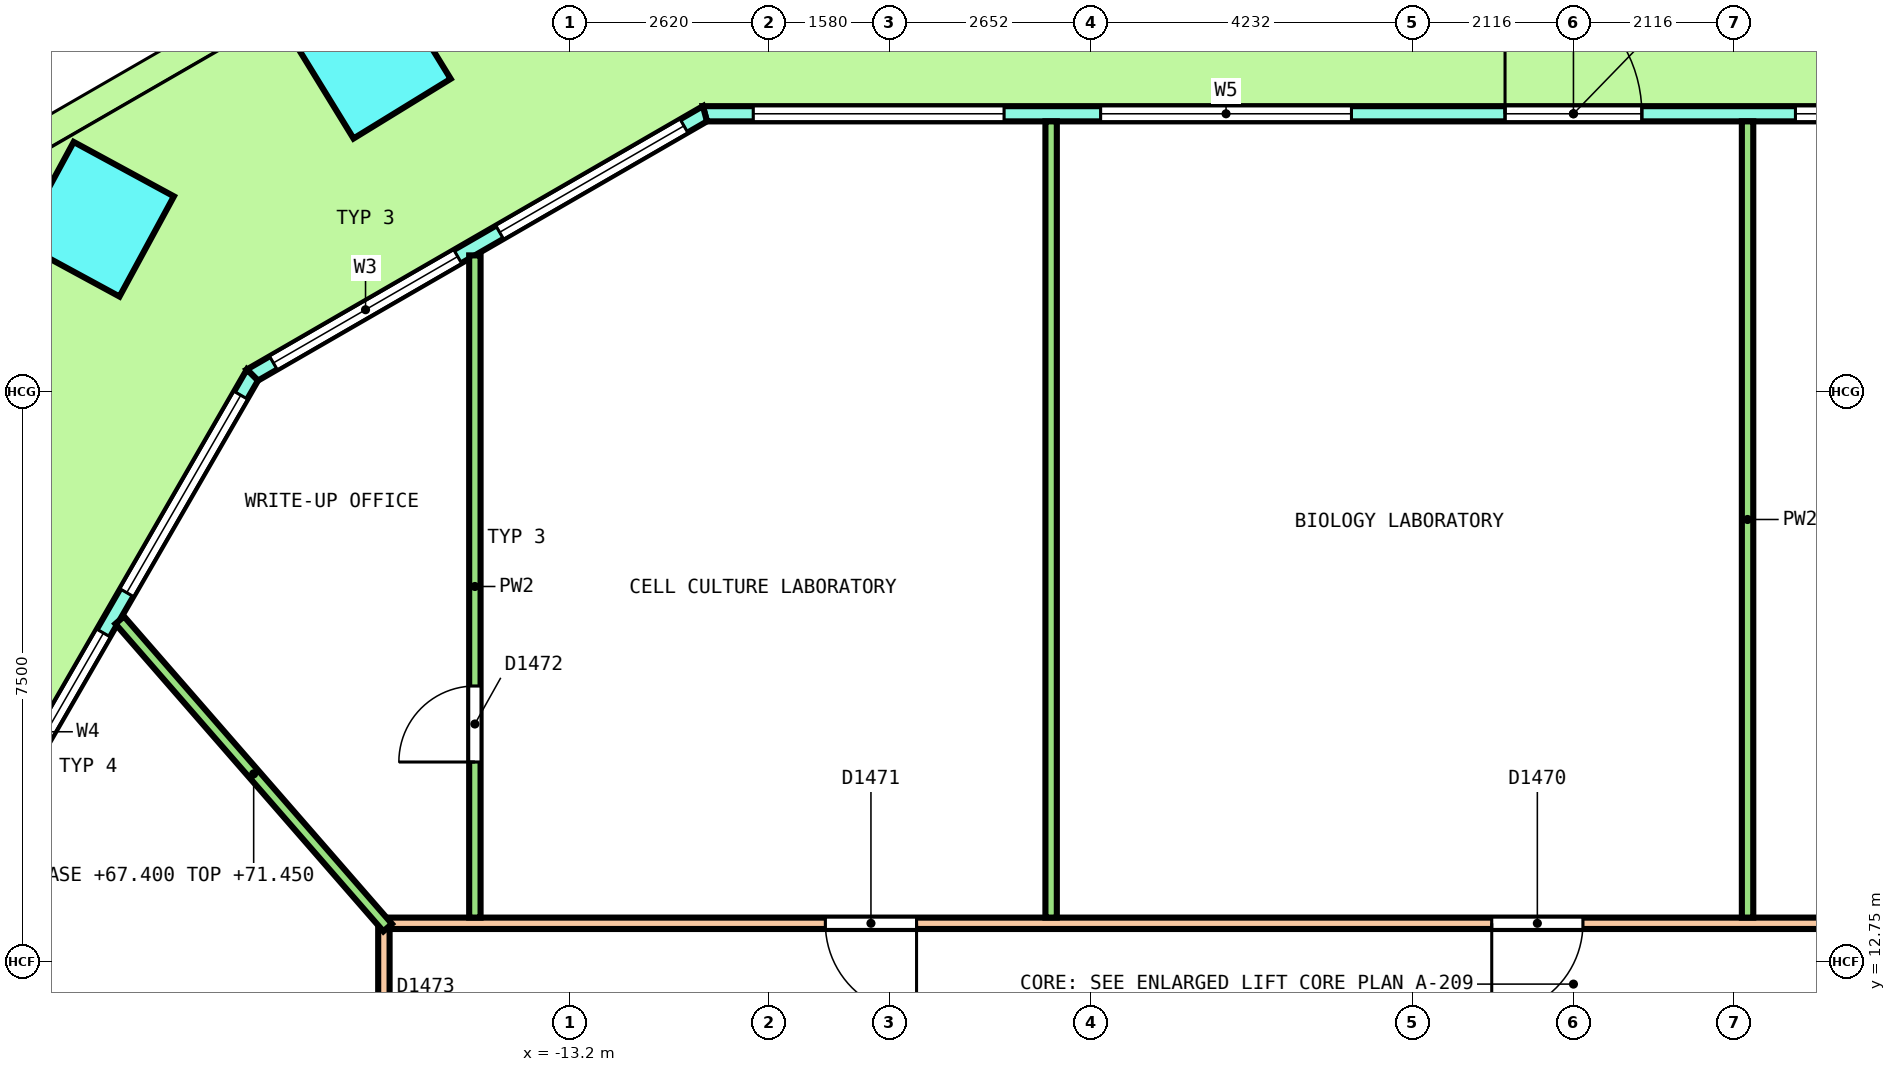
"""IFC4 building model, lengths in metres.
Left out: names, types, materials, properties, quantities, classifications, styles, units other than length and angle.
Written with IfcOpenShell. Run it as: python <this file> out.ifc"""

import sys

from ifc_helpers import new_model, si_unit, direction, frame, frame_2d, origin, origin_2d, place, context, subcontext, project, spatial, polyline, rectangle, outline, extrude, element, fill, save


model = new_model("IFC4")
c1 = context("Model", 3, precision=1e-05, world=origin(), true_north=direction((0.0, 1.0)))
c2 = subcontext(c1, "Body", "Model", "MODEL_VIEW")
j1 = project(units=[si_unit("LENGTHUNIT", "METRE"), si_unit("PLANEANGLEUNIT", "RADIAN")], contexts=[c1])
p1 = place(None, origin())
s1 = spatial("IfcSite", under=j1, at=p1, CompositionType="ELEMENT")
p2 = place(p1, origin())
s2 = spatial("IfcBuilding", under=s1, at=p2, CompositionType="ELEMENT")
p3 = place(p2, frame((0.0, 0.0, 67.4)))
s3 = spatial("IfcBuildingStorey", under=s2, at=p3, CompositionType="ELEMENT", Elevation=67.4)
for number, where, z_axis, x_axis in (
    (1, (-15.803, 24.606, 0.0), (0.341, 0.0, 0.94), (-0.801, -0.523, 0.291)),
    (2, (-19.43, 22.512, 0.0), (0.341, 0.0, 0.94), (-0.448, -0.879, 0.163)),
):
    element("IfcColumn", number, at=place(p3, frame(where, z_axis=z_axis, x_axis=x_axis)), inside=s3, PredefinedType="COLUMN", context=c2, shape_type="SweptSolid", body=[
        extrude(rectangle(XDim=1.5, YDim=1.5, at=origin_2d()), origin(), (0.0, 0.0, 1.0), 4.298),
    ])
p4 = place(p3, frame((-21.386, 19.124, 0.0), z_axis=(0.309930766279, -0.059635152069, 0.948887015799), x_axis=(-0.470498954611, -0.8768780975, 0.098567417711)))
e3 = element("IfcColumn", 3, at=p4, inside=s3, PredefinedType="COLUMN", context=c2, shape_type="SweptSolid", body=[
    extrude(rectangle(XDim=1.5, YDim=1.5, at=origin_2d()), origin(), (0.0, 0.0, 1.0), 4.258),
])
p5 = place(p3, frame((11.426, 23.9, 0.0), z_axis=(0.0, 0.0, 1.0), x_axis=(-1.0, 0.0, 0.0)))
e4 = element("IfcWall", 4, at=p5, inside=s3, PredefinedType="SOLIDWALL", context=c2, shape_type="SweptSolid", body=[
    extrude(outline(polyline([(-0.027, -0.1), (1.014, -0.1), (2.055, -0.1), (3.097, -0.1), (4.138, -0.1), (5.179, -0.1), (6.22, -0.1), (7.261, -0.1), (8.303, -0.1), (9.344, -0.1), (10.385, -0.1), (11.426, -0.1), (12.468, -0.1), (13.509, -0.1), (14.55, -0.1), (15.591, -0.1), (16.632, -0.1), (17.673, -0.1), (18.715, -0.1), (19.756, -0.1), (20.797, -0.1), (21.838, -0.1), (22.879, -0.1), (22.826, 0.1), (21.789, 0.1), (20.753, 0.1), (19.717, 0.1), (18.68, 0.1), (17.644, 0.1), (16.608, 0.1), (15.572, 0.1), (14.535, 0.1), (13.499, 0.1), (12.463, 0.1), (11.426, 0.1), (10.39, 0.1), (9.354, 0.1), (8.317, 0.1), (7.281, 0.1), (6.245, 0.1), (5.208, 0.1), (4.172, 0.1), (3.136, 0.1), (2.099, 0.1), (1.063, 0.1), (0.027, 0.1), (-0.027, -0.1)])), origin(), (0.0, 0.0, 1.0), 4.1),
])
p6 = place(p5, frame((0.635, 0.0, 0.1)))
e5 = element("IfcOpeningElement", 5, at=p6, cuts=e4, PredefinedType="OPENING", context=c2, shape_type="SweptSolid", body=[
    extrude(rectangle(XDim=3.3, YDim=2.9, at=frame_2d((1.65, 1.45))), frame((0.0, 0.11, 0.0), z_axis=(0.0, -1.0, 0.0), x_axis=(1.0, 0.0, 0.0)), (0.0, 0.0, 1.0), 0.22),
])
p7 = place(p5, frame((5.206, 0.0, 0.1)))
e6 = element("IfcOpeningElement", 6, at=p7, cuts=e4, PredefinedType="OPENING", context=c2, shape_type="SweptSolid", body=[
    extrude(rectangle(XDim=3.3, YDim=2.9, at=frame_2d((1.65, 1.45))), frame((0.0, 0.11, 0.0), z_axis=(0.0, -1.0, 0.0), x_axis=(1.0, 0.0, 0.0)), (0.0, 0.0, 1.0), 0.22),
])
p8 = place(p5, frame((10.526, 0.0, 0.0)))
e7 = element("IfcOpeningElement", 7, at=p8, cuts=e4, PredefinedType="OPENING", context=c2, shape_type="SweptSolid", body=[
    extrude(rectangle(XDim=1.8, YDim=2.4, at=frame_2d((0.9, 1.2))), frame((0.0, 0.11, 0.0), z_axis=(0.0, -1.0, 0.0), x_axis=(1.0, 0.0, 0.0)), (0.0, 0.0, 1.0), 0.22),
])
p9 = place(p5, frame((10.526, 0.0, 2.55)))
e8 = element("IfcOpeningElement", 8, at=p9, cuts=e4, PredefinedType="OPENING", context=c2, shape_type="SweptSolid", body=[
    extrude(rectangle(XDim=1.8, YDim=0.45, at=frame_2d((0.9, 0.225))), frame((0.0, 0.11, 0.0), z_axis=(0.0, -1.0, 0.0), x_axis=(1.0, 0.0, 0.0)), (0.0, 0.0, 1.0), 0.22),
])
p10 = place(p5, frame((14.347, 0.0, 0.1)))
e9 = element("IfcOpeningElement", 9, at=p10, cuts=e4, PredefinedType="OPENING", context=c2, shape_type="SweptSolid", body=[
    extrude(rectangle(XDim=3.3, YDim=2.9, at=frame_2d((1.65, 1.45))), frame((0.0, 0.11, 0.0), z_axis=(0.0, -1.0, 0.0), x_axis=(1.0, 0.0, 0.0)), (0.0, 0.0, 1.0), 0.22),
])
p11 = place(p5, frame((18.917, 0.0, 0.1)))
e10 = element("IfcOpeningElement", 10, at=p11, cuts=e4, PredefinedType="OPENING", context=c2, shape_type="SweptSolid", body=[
    extrude(rectangle(XDim=3.3, YDim=2.9, at=frame_2d((1.65, 1.45))), frame((0.0, 0.11, 0.0), z_axis=(0.0, -1.0, 0.0), x_axis=(1.0, 0.0, 0.0)), (0.0, 0.0, 1.0), 0.22),
])
p12 = place(p3, frame((-11.426, 23.9, 0.0), z_axis=(0.0, 0.0, 1.0), x_axis=(-0.866029458321, -0.49999297727, 0.0)))
e11 = element("IfcWall", 11, at=p12, inside=s3, PredefinedType="SOLIDWALL", context=c2, shape_type="SweptSolid", body=[
    extrude(outline(polyline([(-0.027, -0.1), (1.128, -0.1), (2.282, -0.1), (3.437, -0.1), (4.592, -0.1), (5.747, -0.1), (6.901, -0.1), (6.848, 0.1), (5.711, 0.1), (4.574, 0.1), (3.437, 0.1), (2.301, 0.1), (1.164, 0.1), (0.027, 0.1), (-0.027, -0.1)])), origin(), (0.0, 0.0, 1.0), 4.1),
])
p13 = place(p12, frame((0.319, 0.0, 0.1)))
e12 = element("IfcOpeningElement", 12, at=p13, cuts=e11, PredefinedType="OPENING", context=c2, shape_type="SweptSolid", body=[
    extrude(rectangle(XDim=2.8, YDim=2.9, at=frame_2d((1.4, 1.45))), frame((0.0, 0.11, 0.0), z_axis=(0.0, -1.0, 0.0), x_axis=(1.0, 0.0, 0.0)), (0.0, 0.0, 1.0), 0.22),
])
p14 = place(p12, frame((3.756, 0.0, 0.1)))
e13 = element("IfcOpeningElement", 13, at=p14, cuts=e11, PredefinedType="OPENING", context=c2, shape_type="SweptSolid", body=[
    extrude(rectangle(XDim=2.8, YDim=2.9, at=frame_2d((1.4, 1.45))), frame((0.0, 0.11, 0.0), z_axis=(0.0, -1.0, 0.0), x_axis=(1.0, 0.0, 0.0)), (0.0, 0.0, 1.0), 0.22),
])
p15 = place(p3, frame((-17.38, 20.463, 0.0), z_axis=(0.0, 0.0, 1.0), x_axis=(-0.500000137386, -0.866025324465, 0.0)))
e14 = element("IfcWall", 14, at=p15, inside=s3, PredefinedType="SOLIDWALL", context=c2, shape_type="SweptSolid", body=[
    extrude(outline(polyline([(-0.027, -0.1), (0.979, -0.1), (1.986, -0.1), (2.992, -0.1), (3.999, -0.1), (5.005, -0.1), (6.012, -0.1), (7.018, -0.1), (8.025, -0.1), (9.031, -0.1), (10.038, -0.1), (11.044, -0.1), (12.051, -0.1), (13.057, -0.1), (14.063, -0.1), (15.07, -0.1), (16.076, -0.1), (17.083, -0.1), (18.089, -0.1), (18.036, 0.1), (17.035, 0.1), (16.035, 0.1), (15.034, 0.1), (14.034, 0.1), (13.033, 0.1), (12.033, 0.1), (11.032, 0.1), (10.032, 0.1), (9.031, 0.1), (8.031, 0.1), (7.03, 0.1), (6.03, 0.1), (5.029, 0.1), (4.029, 0.1), (3.028, 0.1), (2.028, 0.1), (1.027, 0.1), (0.027, 0.1), (-0.027, -0.1)])), origin(), (0.0, 0.0, 1.0), 4.1),
])
p16 = place(p15, frame((0.306, 0.0, 0.1)))
e15 = element("IfcOpeningElement", 15, at=p16, cuts=e14, PredefinedType="OPENING", context=c2, shape_type="SweptSolid", body=[
    extrude(rectangle(XDim=3.0, YDim=2.9, at=frame_2d((1.5, 1.45))), frame((0.0, 0.11, 0.0), z_axis=(0.0, -1.0, 0.0), x_axis=(1.0, 0.0, 0.0)), (0.0, 0.0, 1.0), 0.22),
])
p17 = place(p15, frame((3.919, 0.0, 0.1)))
e16 = element("IfcOpeningElement", 16, at=p17, cuts=e14, PredefinedType="OPENING", context=c2, shape_type="SweptSolid", body=[
    extrude(rectangle(XDim=3.0, YDim=2.9, at=frame_2d((1.5, 1.45))), frame((0.0, 0.11, 0.0), z_axis=(0.0, -1.0, 0.0), x_axis=(1.0, 0.0, 0.0)), (0.0, 0.0, 1.0), 0.22),
])
p18 = place(p15, frame((8.131, 0.0, 0.0)))
e17 = element("IfcOpeningElement", 17, at=p18, cuts=e14, PredefinedType="OPENING", context=c2, shape_type="SweptSolid", body=[
    extrude(rectangle(XDim=1.8, YDim=2.4, at=frame_2d((0.9, 1.2))), frame((0.0, 0.11, 0.0), z_axis=(0.0, -1.0, 0.0), x_axis=(1.0, 0.0, 0.0)), (0.0, 0.0, 1.0), 0.22),
])
p19 = place(p15, frame((8.131, 0.0, 2.55)))
e18 = element("IfcOpeningElement", 18, at=p19, cuts=e14, PredefinedType="OPENING", context=c2, shape_type="SweptSolid", body=[
    extrude(rectangle(XDim=1.8, YDim=0.45, at=frame_2d((0.9, 0.225))), frame((0.0, 0.11, 0.0), z_axis=(0.0, -1.0, 0.0), x_axis=(1.0, 0.0, 0.0)), (0.0, 0.0, 1.0), 0.22),
])
p20 = place(p15, frame((11.144, 0.0, 0.1)))
e19 = element("IfcOpeningElement", 19, at=p20, cuts=e14, PredefinedType="OPENING", context=c2, shape_type="SweptSolid", body=[
    extrude(rectangle(XDim=3.0, YDim=2.9, at=frame_2d((1.5, 1.45))), frame((0.0, 0.11, 0.0), z_axis=(0.0, -1.0, 0.0), x_axis=(1.0, 0.0, 0.0)), (0.0, 0.0, 1.0), 0.22),
])
p21 = place(p15, frame((14.756, 0.0, 0.1)))
e20 = element("IfcOpeningElement", 20, at=p21, cuts=e14, PredefinedType="OPENING", context=c2, shape_type="SweptSolid", body=[
    extrude(rectangle(XDim=3.0, YDim=2.9, at=frame_2d((1.5, 1.45))), frame((0.0, 0.11, 0.0), z_axis=(0.0, -1.0, 0.0), x_axis=(1.0, 0.0, 0.0)), (0.0, 0.0, 1.0), 0.22),
])
p22 = place(p3, frame((-15.575, 13.25, 0.0), z_axis=(0.0, 0.0, 1.0), x_axis=(1.0, 0.0, 0.0)))
e21 = element("IfcWall", 21, at=p22, inside=s3, PredefinedType="PARTITIONING", context=c2, shape_type="SweptSolid", body=[
    extrude(rectangle(XDim=31.15, YDim=0.15, at=frame_2d((15.575, 0.0))), origin(), (0.0, 0.0, 1.0), 3.05),
])
p23 = place(p22, frame((21.081, 0.0, 0.0)))
e22 = element("IfcOpeningElement", 22, at=p23, cuts=e21, PredefinedType="OPENING", context=c2, shape_type="SweptSolid", body=[
    extrude(rectangle(XDim=1.2, YDim=2.1, at=frame_2d((0.6, 1.05))), frame((0.0, 0.085, 0.0), z_axis=(0.0, -1.0, 0.0), x_axis=(1.0, 0.0, 0.0)), (0.0, 0.0, 1.0), 0.17),
])
p24 = place(p22, frame((14.5, 0.0, 0.0)))
e23 = element("IfcOpeningElement", 23, at=p24, cuts=e21, PredefinedType="OPENING", context=c2, shape_type="SweptSolid", body=[
    extrude(rectangle(XDim=1.2, YDim=2.1, at=frame_2d((0.6, 1.05))), frame((0.0, 0.085, 0.0), z_axis=(0.0, -1.0, 0.0), x_axis=(1.0, 0.0, 0.0)), (0.0, 0.0, 1.0), 0.17),
])
p25 = place(p22, frame((5.733, 0.0, 0.0)))
e24 = element("IfcOpeningElement", 24, at=p25, cuts=e21, PredefinedType="OPENING", context=c2, shape_type="SweptSolid", body=[
    extrude(rectangle(XDim=1.2, YDim=2.1, at=frame_2d((0.6, 1.05))), frame((0.0, 0.085, 0.0), z_axis=(0.0, -1.0, 0.0), x_axis=(1.0, 0.0, 0.0)), (0.0, 0.0, 1.0), 0.17),
])
p26 = place(p3, frame((-15.65, -13.175, 0.0), z_axis=(0.0, 0.0, 1.0), x_axis=(0.0, 1.0, 0.0)))
e25 = element("IfcWall", 25, at=p26, inside=s3, PredefinedType="PARTITIONING", context=c2, shape_type="SweptSolid", body=[
    extrude(rectangle(XDim=26.35, YDim=0.15, at=frame_2d((13.175, 0.0))), origin(), (0.0, 0.0, 1.0), 3.05),
])
p27 = place(p26, frame((24.034, 0.0, 0.0)))
e26 = element("IfcOpeningElement", 26, at=p27, cuts=e25, PredefinedType="OPENING", context=c2, shape_type="SweptSolid", body=[
    extrude(rectangle(XDim=1.2, YDim=2.1, at=frame_2d((0.6, 1.05))), frame((0.0, 0.085, 0.0), z_axis=(0.0, -1.0, 0.0), x_axis=(1.0, 0.0, 0.0)), (0.0, 0.0, 1.0), 0.17),
])
p28 = place(p26, frame((16.553, 0.0, 0.0)))
e27 = element("IfcOpeningElement", 27, at=p28, cuts=e25, PredefinedType="OPENING", context=c2, shape_type="SweptSolid", body=[
    extrude(rectangle(XDim=1.2, YDim=2.1, at=frame_2d((0.6, 1.05))), frame((0.0, 0.085, 0.0), z_axis=(0.0, -1.0, 0.0), x_axis=(1.0, 0.0, 0.0)), (0.0, 0.0, 1.0), 0.17),
])
p29 = place(p26, frame((10.242, 0.0, 0.0)))
e28 = element("IfcOpeningElement", 28, at=p29, cuts=e25, PredefinedType="OPENING", context=c2, shape_type="SweptSolid", body=[
    extrude(rectangle(XDim=1.2, YDim=2.1, at=frame_2d((0.6, 1.05))), frame((0.0, 0.085, 0.0), z_axis=(0.0, -1.0, 0.0), x_axis=(1.0, 0.0, 0.0)), (0.0, 0.0, 1.0), 0.17),
])
p30 = place(p26, frame((3.851, 0.0, 0.0)))
e29 = element("IfcOpeningElement", 29, at=p30, cuts=e25, PredefinedType="OPENING", context=c2, shape_type="SweptSolid", body=[
    extrude(rectangle(XDim=1.0, YDim=2.1, at=frame_2d((0.5, 1.05))), frame((0.0, 0.085, 0.0), z_axis=(0.0, -1.0, 0.0), x_axis=(1.0, 0.0, 0.0)), (0.0, 0.0, 1.0), 0.17),
])
p31 = place(p3, frame((2.291, 13.325, 0.0), z_axis=(0.0, 0.0, 1.0), x_axis=(0.0, 1.0, 0.0)))
e30 = element("IfcWall", 30, at=p31, inside=s3, PredefinedType="PARTITIONING", context=c2, shape_type="SweptSolid", body=[
    extrude(rectangle(XDim=10.475, YDim=0.15, at=frame_2d((5.238, 0.0))), origin(), (0.0, 0.0, 1.0), 4.05),
])
p32 = place(p3, frame((-6.872, 13.325, 0.0), z_axis=(0.0, 0.0, 1.0), x_axis=(0.0, 1.0, 0.0)))
e31 = element("IfcWall", 31, at=p32, inside=s3, PredefinedType="PARTITIONING", context=c2, shape_type="SweptSolid", body=[
    extrude(rectangle(XDim=10.475, YDim=0.15, at=frame_2d((5.238, 0.0))), origin(), (0.0, 0.0, 1.0), 3.05),
])
p33 = place(p3, frame((-14.453, 13.325, 0.0), z_axis=(0.0, 0.0, 1.0), x_axis=(0.0, 1.0, 0.0)))
e32 = element("IfcWall", 32, at=p33, inside=s3, PredefinedType="PARTITIONING", context=c2, shape_type="SweptSolid", body=[
    extrude(rectangle(XDim=8.712, YDim=0.15, at=frame_2d((4.356, 0.0))), origin(), (0.0, 0.0, 1.0), 3.05),
])
p34 = place(p33, frame((2.047, 0.0, 0.0)))
e33 = element("IfcOpeningElement", 33, at=p34, cuts=e32, PredefinedType="OPENING", context=c2, shape_type="SweptSolid", body=[
    extrude(rectangle(XDim=1.0, YDim=2.1, at=frame_2d((0.5, 1.05))), frame((0.0, 0.085, 0.0), z_axis=(0.0, -1.0, 0.0), x_axis=(1.0, 0.0, 0.0)), (0.0, 0.0, 1.0), 0.17),
])
p35 = place(p3, frame((-19.126, 17.239, 0.0), z_axis=(0.0, 0.0, 1.0), x_axis=(0.65698603945, -0.753902741717, 0.0)))
e34 = element("IfcWall", 34, at=p35, inside=s3, PredefinedType="PARTITIONING", context=c2, shape_type="SweptSolid", body=[
    extrude(rectangle(XDim=5.366, YDim=0.15, at=frame_2d((2.683, 0.0))), origin(), (0.0, 0.0, 1.0), 4.05),
])
p36 = place(p7, origin())
e35 = element("IfcWindow", 35, at=p36, inside=s3, PartitioningType="SINGLE_PANEL", PredefinedType="WINDOW", context=c2, shape_type="SweptSolid", body=[
    extrude(rectangle(XDim=3.3, YDim=2.9, at=frame_2d((1.65, 1.45))), frame((0.0, 0.03, 0.0), z_axis=(0.0, -1.0, 0.0), x_axis=(1.0, 0.0, 0.0)), (0.0, 0.0, 1.0), 0.06),
])
fill(e6, e35)
p37 = place(p8, origin())
e36 = element("IfcDoor", 36, at=p37, inside=s3, OperationType="DOUBLE_DOOR_SINGLE_SWING", PredefinedType="DOOR", context=c2, shape_type="SweptSolid", body=[
    extrude(rectangle(XDim=1.8, YDim=2.4, at=frame_2d((0.9, 1.2))), frame((0.0, 0.025, 0.0), z_axis=(0.0, -1.0, 0.0), x_axis=(1.0, 0.0, 0.0)), (0.0, 0.0, 1.0), 0.05),
])
fill(e7, e36)
p38 = place(p9, origin())
e37 = element("IfcWindow", 37, at=p38, inside=s3, PartitioningType="SINGLE_PANEL", PredefinedType="WINDOW", context=c2, shape_type="SweptSolid", body=[
    extrude(rectangle(XDim=1.8, YDim=0.45, at=frame_2d((0.9, 0.225))), frame((0.0, 0.03, 0.0), z_axis=(0.0, -1.0, 0.0), x_axis=(1.0, 0.0, 0.0)), (0.0, 0.0, 1.0), 0.06),
])
fill(e8, e37)
p39 = place(p10, origin())
e38 = element("IfcWindow", 38, at=p39, inside=s3, PartitioningType="SINGLE_PANEL", PredefinedType="WINDOW", context=c2, shape_type="SweptSolid", body=[
    extrude(rectangle(XDim=3.3, YDim=2.9, at=frame_2d((1.65, 1.45))), frame((0.0, 0.03, 0.0), z_axis=(0.0, -1.0, 0.0), x_axis=(1.0, 0.0, 0.0)), (0.0, 0.0, 1.0), 0.06),
])
fill(e9, e38)
p40 = place(p11, origin())
e39 = element("IfcWindow", 39, at=p40, inside=s3, PartitioningType="SINGLE_PANEL", PredefinedType="WINDOW", context=c2, shape_type="SweptSolid", body=[
    extrude(rectangle(XDim=3.3, YDim=2.9, at=frame_2d((1.65, 1.45))), frame((0.0, 0.03, 0.0), z_axis=(0.0, -1.0, 0.0), x_axis=(1.0, 0.0, 0.0)), (0.0, 0.0, 1.0), 0.06),
])
fill(e10, e39)
p41 = place(p13, origin())
e40 = element("IfcWindow", 40, at=p41, inside=s3, PartitioningType="SINGLE_PANEL", PredefinedType="WINDOW", context=c2, shape_type="SweptSolid", body=[
    extrude(rectangle(XDim=2.8, YDim=2.9, at=frame_2d((1.4, 1.45))), frame((0.0, 0.03, 0.0), z_axis=(0.0, -1.0, 0.0), x_axis=(1.0, 0.0, 0.0)), (0.0, 0.0, 1.0), 0.06),
])
fill(e12, e40)
p42 = place(p14, origin())
e41 = element("IfcWindow", 41, at=p42, inside=s3, PartitioningType="SINGLE_PANEL", PredefinedType="WINDOW", context=c2, shape_type="SweptSolid", body=[
    extrude(rectangle(XDim=2.8, YDim=2.9, at=frame_2d((1.4, 1.45))), frame((0.0, 0.03, 0.0), z_axis=(0.0, -1.0, 0.0), x_axis=(1.0, 0.0, 0.0)), (0.0, 0.0, 1.0), 0.06),
])
fill(e13, e41)
p43 = place(p16, origin())
e42 = element("IfcWindow", 42, at=p43, inside=s3, PartitioningType="SINGLE_PANEL", PredefinedType="WINDOW", context=c2, shape_type="SweptSolid", body=[
    extrude(rectangle(XDim=3.0, YDim=2.9, at=frame_2d((1.5, 1.45))), frame((0.0, 0.03, 0.0), z_axis=(0.0, -1.0, 0.0), x_axis=(1.0, 0.0, 0.0)), (0.0, 0.0, 1.0), 0.06),
])
fill(e15, e42)
p44 = place(p17, origin())
e43 = element("IfcWindow", 43, at=p44, inside=s3, PartitioningType="SINGLE_PANEL", PredefinedType="WINDOW", context=c2, shape_type="SweptSolid", body=[
    extrude(rectangle(XDim=3.0, YDim=2.9, at=frame_2d((1.5, 1.45))), frame((0.0, 0.03, 0.0), z_axis=(0.0, -1.0, 0.0), x_axis=(1.0, 0.0, 0.0)), (0.0, 0.0, 1.0), 0.06),
])
fill(e16, e43)
p45 = place(p24, origin())
e44 = element("IfcDoor", 44, at=p45, inside=s3, OperationType="DOUBLE_DOOR_SINGLE_SWING", PredefinedType="DOOR", context=c2, shape_type="SweptSolid", body=[
    extrude(rectangle(XDim=1.2, YDim=2.1, at=frame_2d((0.6, 1.05))), frame((0.0, 0.025, 0.0), z_axis=(0.0, -1.0, 0.0), x_axis=(1.0, 0.0, 0.0)), (0.0, 0.0, 1.0), 0.05),
])
fill(e23, e44)
p46 = place(p25, origin())
e45 = element("IfcDoor", 45, at=p46, inside=s3, OperationType="DOUBLE_DOOR_SINGLE_SWING", PredefinedType="DOOR", context=c2, shape_type="SweptSolid", body=[
    extrude(rectangle(XDim=1.2, YDim=2.1, at=frame_2d((0.6, 1.05))), frame((0.0, 0.025, 0.0), z_axis=(0.0, -1.0, 0.0), x_axis=(1.0, 0.0, 0.0)), (0.0, 0.0, 1.0), 0.05),
])
fill(e24, e45)
p47 = place(p34, origin())
e46 = element("IfcDoor", 46, at=p47, inside=s3, OperationType="SINGLE_SWING_RIGHT", PredefinedType="DOOR", context=c2, shape_type="SweptSolid", body=[
    extrude(rectangle(XDim=1.0, YDim=2.1, at=frame_2d((0.5, 1.05))), frame((0.0, 0.025, 0.0), z_axis=(0.0, -1.0, 0.0), x_axis=(1.0, 0.0, 0.0)), (0.0, 0.0, 1.0), 0.05),
])
fill(e33, e46)
save(model, sys.argv[1])
